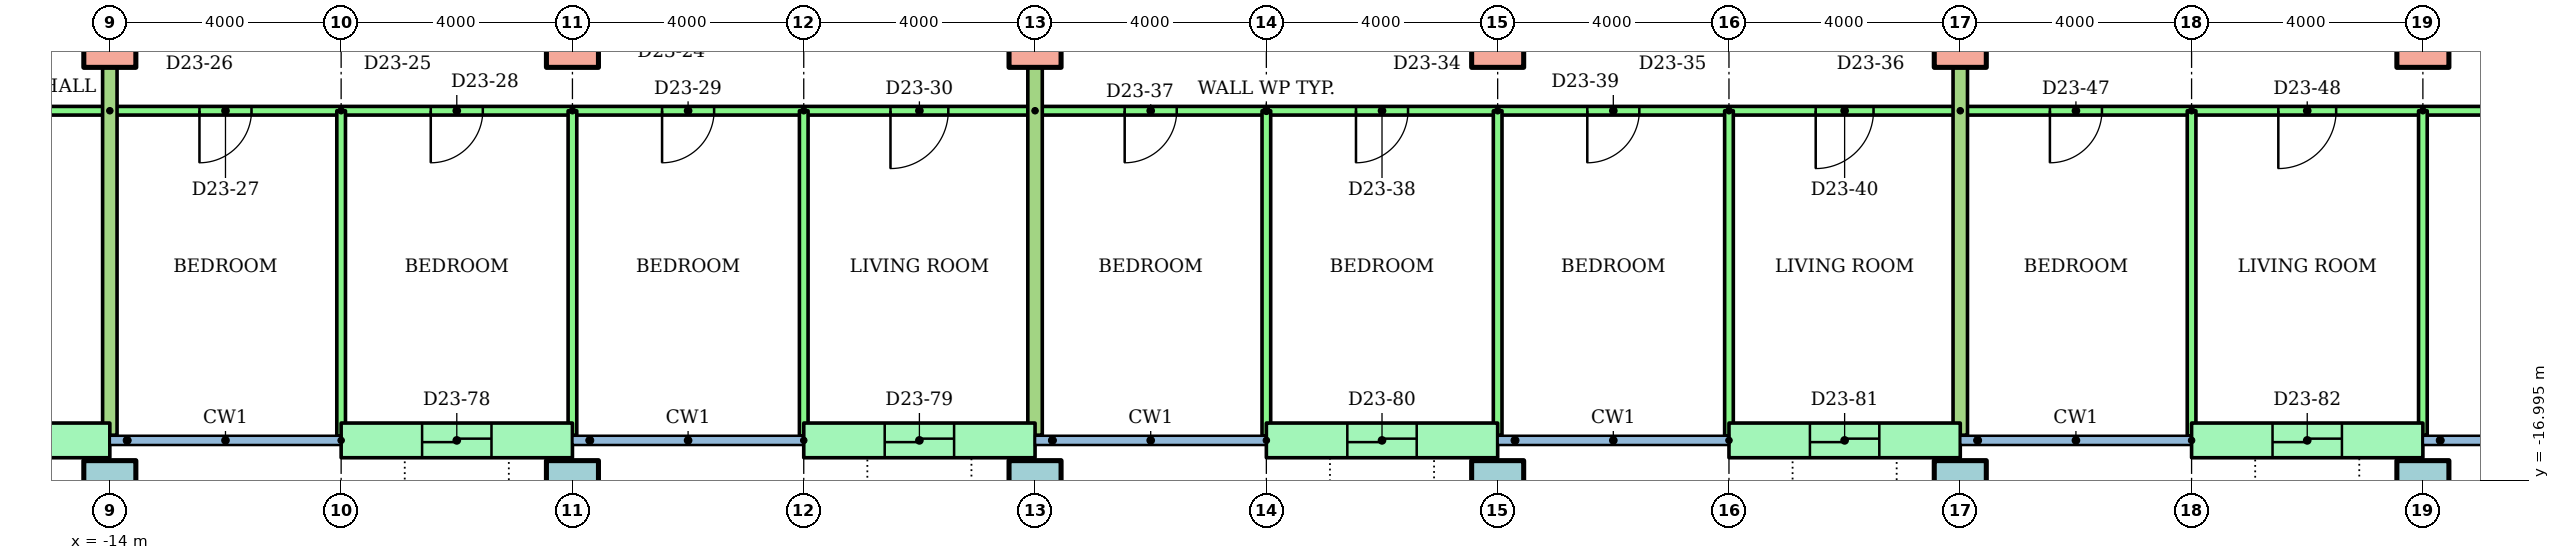
"""IFC4 building model, lengths in metres.
Left out: names, types, materials, properties, quantities, classifications, styles, units other than length and angle.
Written with IfcOpenShell. Run it as: python <this file> out.ifc"""

import sys

from ifc_helpers import new_model, si_unit, direction, frame, frame_2d, origin, origin_2d, place, context, subcontext, project, spatial, rectangle, hollow_rectangle, extrude, element, fill, save


model = new_model("IFC4")
c1 = context("Model", 3, precision=1e-05, world=origin(), true_north=direction((0.0, 1.0)))
c2 = subcontext(c1, "Body", "Model", "MODEL_VIEW")
j1 = project(units=[si_unit("LENGTHUNIT", "METRE"), si_unit("PLANEANGLEUNIT", "RADIAN")], contexts=[c1])
p1 = place(None, origin())
s1 = spatial("IfcSite", under=j1, at=p1, CompositionType="ELEMENT")
p2 = place(p1, origin())
s2 = spatial("IfcBuilding", under=s1, at=p2, CompositionType="ELEMENT")
p3 = place(p2, frame((0.0, 0.0, 90.3)))
s3 = spatial("IfcBuildingStorey", under=s2, at=p3, CompositionType="ELEMENT", Elevation=90.3)
for number, where in (
    (1, (-14.0, -17.1, 0.0)),
    (2, (-6.0, -17.1, 0.0)),
    (3, (2.0, -17.1, 0.0)),
    (4, (10.0, -17.1, 0.0)),
    (5, (18.0, -17.1, 0.0)),
    (6, (26.0, -17.1, 0.0)),
):
    element("IfcColumn", number, at=place(p3, frame(where)), inside=s3, PredefinedType="COLUMN", context=c2, shape_type="SweptSolid", body=[
        extrude(hollow_rectangle(XDim=0.9, YDim=0.9, WallThickness=0.045, at=origin_2d()), origin(), (0.0, 0.0, 1.0), 3.2),
    ])
for number, where in (
    (7, (-14.0, -9.4, 0.0)),
    (8, (-6.0, -9.4, 0.0)),
    (9, (2.0, -9.4, 0.0)),
    (10, (10.0, -9.4, 0.0)),
    (11, (18.0, -9.4, 0.0)),
    (12, (26.0, -9.4, 0.0)),
):
    element("IfcColumn", number, at=place(p3, frame(where)), inside=s3, PredefinedType="COLUMN", context=c2, shape_type="SweptSolid", body=[
        extrude(rectangle(XDim=0.9, YDim=0.9, at=origin_2d()), origin(), (0.0, 0.0, 1.0), 3.2),
    ])
p4 = place(p3, frame((-18.0, -16.3, 0.0)))
e13 = element("IfcWall", 13, at=p4, inside=s3, PredefinedType="STANDARD", context=c2, shape_type="SweptSolid", body=[
    extrude(rectangle(XDim=4.0, YDim=0.6, at=frame_2d((2.0, 0.0))), origin(), (0.0, 0.0, 1.0), 2.92),
])
p5 = place(p4, frame((1.4, 0.0, 0.0)))
e14 = element("IfcOpeningElement", 14, at=p5, cuts=e13, PredefinedType="OPENING", context=c2, shape_type="SweptSolid", body=[
    extrude(rectangle(XDim=1.2, YDim=2.1, at=frame_2d((0.6, 1.05))), frame((0.0, 0.31, 0.0), z_axis=(0.0, -1.0, 0.0), x_axis=(1.0, 0.0, 0.0)), (0.0, 0.0, 1.0), 0.62),
])
p6 = place(p3, frame((-10.0, -16.3, 0.0)))
e15 = element("IfcWall", 15, at=p6, inside=s3, PredefinedType="STANDARD", context=c2, shape_type="SweptSolid", body=[
    extrude(rectangle(XDim=4.0, YDim=0.6, at=frame_2d((2.0, 0.0))), origin(), (0.0, 0.0, 1.0), 2.92),
])
p7 = place(p6, frame((1.4, 0.0, 0.0)))
e16 = element("IfcOpeningElement", 16, at=p7, cuts=e15, PredefinedType="OPENING", context=c2, shape_type="SweptSolid", body=[
    extrude(rectangle(XDim=1.2, YDim=2.1, at=frame_2d((0.6, 1.05))), frame((0.0, 0.31, 0.0), z_axis=(0.0, -1.0, 0.0), x_axis=(1.0, 0.0, 0.0)), (0.0, 0.0, 1.0), 0.62),
])
p8 = place(p3, frame((-2.0, -16.3, 0.0)))
e17 = element("IfcWall", 17, at=p8, inside=s3, PredefinedType="STANDARD", context=c2, shape_type="SweptSolid", body=[
    extrude(rectangle(XDim=4.0, YDim=0.6, at=frame_2d((2.0, 0.0))), origin(), (0.0, 0.0, 1.0), 2.92),
])
p9 = place(p8, frame((1.4, 0.0, 0.0)))
e18 = element("IfcOpeningElement", 18, at=p9, cuts=e17, PredefinedType="OPENING", context=c2, shape_type="SweptSolid", body=[
    extrude(rectangle(XDim=1.2, YDim=2.1, at=frame_2d((0.6, 1.05))), frame((0.0, 0.31, 0.0), z_axis=(0.0, -1.0, 0.0), x_axis=(1.0, 0.0, 0.0)), (0.0, 0.0, 1.0), 0.62),
])
p10 = place(p3, frame((6.0, -16.3, 0.0)))
e19 = element("IfcWall", 19, at=p10, inside=s3, PredefinedType="STANDARD", context=c2, shape_type="SweptSolid", body=[
    extrude(rectangle(XDim=4.0, YDim=0.6, at=frame_2d((2.0, 0.0))), origin(), (0.0, 0.0, 1.0), 2.92),
])
p11 = place(p10, frame((1.4, 0.0, 0.0)))
e20 = element("IfcOpeningElement", 20, at=p11, cuts=e19, PredefinedType="OPENING", context=c2, shape_type="SweptSolid", body=[
    extrude(rectangle(XDim=1.2, YDim=2.1, at=frame_2d((0.6, 1.05))), frame((0.0, 0.31, 0.0), z_axis=(0.0, -1.0, 0.0), x_axis=(1.0, 0.0, 0.0)), (0.0, 0.0, 1.0), 0.62),
])
p12 = place(p3, frame((14.0, -16.3, 0.0)))
e21 = element("IfcWall", 21, at=p12, inside=s3, PredefinedType="STANDARD", context=c2, shape_type="SweptSolid", body=[
    extrude(rectangle(XDim=4.0, YDim=0.6, at=frame_2d((2.0, 0.0))), origin(), (0.0, 0.0, 1.0), 2.92),
])
p13 = place(p12, frame((1.4, 0.0, 0.0)))
e22 = element("IfcOpeningElement", 22, at=p13, cuts=e21, PredefinedType="OPENING", context=c2, shape_type="SweptSolid", body=[
    extrude(rectangle(XDim=1.2, YDim=2.1, at=frame_2d((0.6, 1.05))), frame((0.0, 0.31, 0.0), z_axis=(0.0, -1.0, 0.0), x_axis=(1.0, 0.0, 0.0)), (0.0, 0.0, 1.0), 0.62),
])
p14 = place(p3, frame((22.0, -16.3, 0.0)))
e23 = element("IfcWall", 23, at=p14, inside=s3, PredefinedType="STANDARD", context=c2, shape_type="SweptSolid", body=[
    extrude(rectangle(XDim=4.0, YDim=0.6, at=frame_2d((2.0, 0.0))), origin(), (0.0, 0.0, 1.0), 2.92),
])
p15 = place(p14, frame((1.4, 0.0, 0.0)))
e24 = element("IfcOpeningElement", 24, at=p15, cuts=e23, PredefinedType="OPENING", context=c2, shape_type="SweptSolid", body=[
    extrude(rectangle(XDim=1.2, YDim=2.1, at=frame_2d((0.6, 1.05))), frame((0.0, 0.31, 0.0), z_axis=(0.0, -1.0, 0.0), x_axis=(1.0, 0.0, 0.0)), (0.0, 0.0, 1.0), 0.62),
])
p16 = place(p3, frame((-14.0, -10.6, 0.0), z_axis=(0.0, 0.0, 1.0), x_axis=(-1.0, 0.0, 0.0)))
e25 = element("IfcWall", 25, at=p16, inside=s3, PredefinedType="PARTITIONING", context=c2, shape_type="SweptSolid", body=[
    extrude(rectangle(XDim=14.62, YDim=0.15, at=frame_2d((7.31, 0.0))), origin(), (0.0, 0.0, 1.0), 2.4),
])
p17 = place(p16, frame((11.7, 0.0, 0.0)))
e26 = element("IfcOpeningElement", 26, at=p17, cuts=e25, PredefinedType="OPENING", context=c2, shape_type="SweptSolid", body=[
    extrude(rectangle(XDim=0.9, YDim=2.1, at=frame_2d((0.45, 1.05))), frame((0.0, 0.085, 0.0), z_axis=(0.0, -1.0, 0.0), x_axis=(1.0, 0.0, 0.0)), (0.0, 0.0, 1.0), 0.17),
])
p18 = place(p16, frame((4.45, 0.0, 0.0)))
e27 = element("IfcOpeningElement", 27, at=p18, cuts=e25, PredefinedType="OPENING", context=c2, shape_type="SweptSolid", body=[
    extrude(rectangle(XDim=1.0, YDim=2.1, at=frame_2d((0.5, 1.05))), frame((0.0, 0.085, 0.0), z_axis=(0.0, -1.0, 0.0), x_axis=(1.0, 0.0, 0.0)), (0.0, 0.0, 1.0), 0.17),
])
p19 = place(p3, frame((2.0, -10.6, 0.0), z_axis=(0.0, 0.0, 1.0), x_axis=(-1.0, 0.0, 0.0)))
e28 = element("IfcWall", 28, at=p19, inside=s3, PredefinedType="PARTITIONING", context=c2, shape_type="SweptSolid", body=[
    extrude(rectangle(XDim=16.0, YDim=0.15, at=frame_2d((8.0, 0.0))), origin(), (0.0, 0.0, 1.0), 2.4),
])
p20 = place(p19, frame((13.55, 0.0, 0.0)))
e29 = element("IfcOpeningElement", 29, at=p20, cuts=e28, PredefinedType="OPENING", context=c2, shape_type="SweptSolid", body=[
    extrude(rectangle(XDim=0.9, YDim=2.1, at=frame_2d((0.45, 1.05))), frame((0.0, 0.085, 0.0), z_axis=(0.0, -1.0, 0.0), x_axis=(1.0, 0.0, 0.0)), (0.0, 0.0, 1.0), 0.17),
])
p21 = place(p19, frame((9.55, 0.0, 0.0)))
e30 = element("IfcOpeningElement", 30, at=p21, cuts=e28, PredefinedType="OPENING", context=c2, shape_type="SweptSolid", body=[
    extrude(rectangle(XDim=0.9, YDim=2.1, at=frame_2d((0.45, 1.05))), frame((0.0, 0.085, 0.0), z_axis=(0.0, -1.0, 0.0), x_axis=(1.0, 0.0, 0.0)), (0.0, 0.0, 1.0), 0.17),
])
p22 = place(p19, frame((5.55, 0.0, 0.0)))
e31 = element("IfcOpeningElement", 31, at=p22, cuts=e28, PredefinedType="OPENING", context=c2, shape_type="SweptSolid", body=[
    extrude(rectangle(XDim=0.9, YDim=2.1, at=frame_2d((0.45, 1.05))), frame((0.0, 0.085, 0.0), z_axis=(0.0, -1.0, 0.0), x_axis=(1.0, 0.0, 0.0)), (0.0, 0.0, 1.0), 0.17),
])
p23 = place(p19, frame((1.5, 0.0, 0.0)))
e32 = element("IfcOpeningElement", 32, at=p23, cuts=e28, PredefinedType="OPENING", context=c2, shape_type="SweptSolid", body=[
    extrude(rectangle(XDim=1.0, YDim=2.1, at=frame_2d((0.5, 1.05))), frame((0.0, 0.085, 0.0), z_axis=(0.0, -1.0, 0.0), x_axis=(1.0, 0.0, 0.0)), (0.0, 0.0, 1.0), 0.17),
])
p24 = place(p3, frame((-10.0, -10.6, 0.0), z_axis=(0.0, 0.0, 1.0), x_axis=(0.0, -1.0, 0.0)))
e33 = element("IfcWall", 33, at=p24, inside=s3, PredefinedType="PARTITIONING", context=c2, shape_type="SweptSolid", body=[
    extrude(rectangle(XDim=5.621, YDim=0.15, at=frame_2d((2.811, 0.0))), origin(), (0.0, 0.0, 1.0), 2.4),
])
p25 = place(p3, frame((-6.0, -10.6, 0.0), z_axis=(0.0, 0.0, 1.0), x_axis=(0.0, -1.0, 0.0)))
e34 = element("IfcWall", 34, at=p25, inside=s3, PredefinedType="PARTITIONING", context=c2, shape_type="SweptSolid", body=[
    extrude(rectangle(XDim=5.61, YDim=0.15, at=frame_2d((2.805, 0.0))), origin(), (0.0, 0.0, 1.0), 2.4),
])
p26 = place(p3, frame((-2.0, -10.6, 0.0), z_axis=(0.0, 0.0, 1.0), x_axis=(0.0, -1.0, 0.0)))
e35 = element("IfcWall", 35, at=p26, inside=s3, PredefinedType="PARTITIONING", context=c2, shape_type="SweptSolid", body=[
    extrude(rectangle(XDim=5.621, YDim=0.15, at=frame_2d((2.811, 0.0))), origin(), (0.0, 0.0, 1.0), 2.4),
])
p27 = place(p3, frame((-14.0, -1.4, 0.0), z_axis=(0.0, 0.0, 1.0), x_axis=(0.0, -1.0, 0.0)))
e36 = element("IfcWall", 36, at=p27, inside=s3, PredefinedType="PARTITIONING", context=c2, shape_type="SweptSolid", body=[
    extrude(rectangle(XDim=14.81, YDim=0.25, at=frame_2d((7.405, 0.0))), origin(), (0.0, 0.0, 1.0), 2.4),
])
p28 = place(p3, frame((18.0, -10.6, 0.0), z_axis=(0.0, 0.0, 1.0), x_axis=(-1.0, 0.0, 0.0)))
e37 = element("IfcWall", 37, at=p28, inside=s3, PredefinedType="PARTITIONING", context=c2, shape_type="SweptSolid", body=[
    extrude(rectangle(XDim=16.0, YDim=0.15, at=frame_2d((8.0, 0.0))), origin(), (0.0, 0.0, 1.0), 2.4),
])
p29 = place(p28, frame((13.55, 0.0, 0.0)))
e38 = element("IfcOpeningElement", 38, at=p29, cuts=e37, PredefinedType="OPENING", context=c2, shape_type="SweptSolid", body=[
    extrude(rectangle(XDim=0.9, YDim=2.1, at=frame_2d((0.45, 1.05))), frame((0.0, 0.085, 0.0), z_axis=(0.0, -1.0, 0.0), x_axis=(1.0, 0.0, 0.0)), (0.0, 0.0, 1.0), 0.17),
])
p30 = place(p28, frame((9.55, 0.0, 0.0)))
e39 = element("IfcOpeningElement", 39, at=p30, cuts=e37, PredefinedType="OPENING", context=c2, shape_type="SweptSolid", body=[
    extrude(rectangle(XDim=0.9, YDim=2.1, at=frame_2d((0.45, 1.05))), frame((0.0, 0.085, 0.0), z_axis=(0.0, -1.0, 0.0), x_axis=(1.0, 0.0, 0.0)), (0.0, 0.0, 1.0), 0.17),
])
p31 = place(p28, frame((5.55, 0.0, 0.0)))
e40 = element("IfcOpeningElement", 40, at=p31, cuts=e37, PredefinedType="OPENING", context=c2, shape_type="SweptSolid", body=[
    extrude(rectangle(XDim=0.9, YDim=2.1, at=frame_2d((0.45, 1.05))), frame((0.0, 0.085, 0.0), z_axis=(0.0, -1.0, 0.0), x_axis=(1.0, 0.0, 0.0)), (0.0, 0.0, 1.0), 0.17),
])
p32 = place(p28, frame((1.5, 0.0, 0.0)))
e41 = element("IfcOpeningElement", 41, at=p32, cuts=e37, PredefinedType="OPENING", context=c2, shape_type="SweptSolid", body=[
    extrude(rectangle(XDim=1.0, YDim=2.1, at=frame_2d((0.5, 1.05))), frame((0.0, 0.085, 0.0), z_axis=(0.0, -1.0, 0.0), x_axis=(1.0, 0.0, 0.0)), (0.0, 0.0, 1.0), 0.17),
])
p33 = place(p3, frame((6.0, -10.6, 0.0), z_axis=(0.0, 0.0, 1.0), x_axis=(0.0, -1.0, 0.0)))
e42 = element("IfcWall", 42, at=p33, inside=s3, PredefinedType="PARTITIONING", context=c2, shape_type="SweptSolid", body=[
    extrude(rectangle(XDim=5.621, YDim=0.15, at=frame_2d((2.811, 0.0))), origin(), (0.0, 0.0, 1.0), 2.4),
])
p34 = place(p3, frame((10.0, -10.6, 0.0), z_axis=(0.0, 0.0, 1.0), x_axis=(0.0, -1.0, 0.0)))
e43 = element("IfcWall", 43, at=p34, inside=s3, PredefinedType="PARTITIONING", context=c2, shape_type="SweptSolid", body=[
    extrude(rectangle(XDim=5.61, YDim=0.15, at=frame_2d((2.805, 0.0))), origin(), (0.0, 0.0, 1.0), 2.4),
])
p35 = place(p3, frame((14.0, -10.6, 0.0), z_axis=(0.0, 0.0, 1.0), x_axis=(0.0, -1.0, 0.0)))
e44 = element("IfcWall", 44, at=p35, inside=s3, PredefinedType="PARTITIONING", context=c2, shape_type="SweptSolid", body=[
    extrude(rectangle(XDim=5.621, YDim=0.15, at=frame_2d((2.811, 0.0))), origin(), (0.0, 0.0, 1.0), 2.4),
])
p36 = place(p3, frame((2.0, -1.4, 0.0), z_axis=(0.0, 0.0, 1.0), x_axis=(0.0, -1.0, 0.0)))
e45 = element("IfcWall", 45, at=p36, inside=s3, PredefinedType="PARTITIONING", context=c2, shape_type="SweptSolid", body=[
    extrude(rectangle(XDim=14.81, YDim=0.25, at=frame_2d((7.405, 0.0))), origin(), (0.0, 0.0, 1.0), 2.4),
])
p37 = place(p3, frame((40.62, -10.6, 0.0), z_axis=(0.0, 0.0, 1.0), x_axis=(-1.0, 0.0, 0.0)))
e46 = element("IfcWall", 46, at=p37, inside=s3, PredefinedType="PARTITIONING", context=c2, shape_type="SweptSolid", body=[
    extrude(rectangle(XDim=22.62, YDim=0.15, at=frame_2d((11.31, 0.0))), origin(), (0.0, 0.0, 1.0), 2.4),
])
p38 = place(p37, frame((20.17, 0.0, 0.0)))
e47 = element("IfcOpeningElement", 47, at=p38, cuts=e46, PredefinedType="OPENING", context=c2, shape_type="SweptSolid", body=[
    extrude(rectangle(XDim=0.9, YDim=2.1, at=frame_2d((0.45, 1.05))), frame((0.0, 0.085, 0.0), z_axis=(0.0, -1.0, 0.0), x_axis=(1.0, 0.0, 0.0)), (0.0, 0.0, 1.0), 0.17),
])
p39 = place(p37, frame((16.12, 0.0, 0.0)))
e48 = element("IfcOpeningElement", 48, at=p39, cuts=e46, PredefinedType="OPENING", context=c2, shape_type="SweptSolid", body=[
    extrude(rectangle(XDim=1.0, YDim=2.1, at=frame_2d((0.5, 1.05))), frame((0.0, 0.085, 0.0), z_axis=(0.0, -1.0, 0.0), x_axis=(1.0, 0.0, 0.0)), (0.0, 0.0, 1.0), 0.17),
])
p40 = place(p37, frame((12.17, 0.0, 0.0)))
e49 = element("IfcOpeningElement", 49, at=p40, cuts=e46, PredefinedType="OPENING", context=c2, shape_type="SweptSolid", body=[
    extrude(rectangle(XDim=0.9, YDim=2.1, at=frame_2d((0.45, 1.05))), frame((0.0, 0.085, 0.0), z_axis=(0.0, -1.0, 0.0), x_axis=(1.0, 0.0, 0.0)), (0.0, 0.0, 1.0), 0.17),
])
p41 = place(p37, frame((8.17, 0.0, 0.0)))
e50 = element("IfcOpeningElement", 50, at=p41, cuts=e46, PredefinedType="OPENING", context=c2, shape_type="SweptSolid", body=[
    extrude(rectangle(XDim=0.9, YDim=2.1, at=frame_2d((0.45, 1.05))), frame((0.0, 0.085, 0.0), z_axis=(0.0, -1.0, 0.0), x_axis=(1.0, 0.0, 0.0)), (0.0, 0.0, 1.0), 0.17),
])
p42 = place(p37, frame((2.97, 0.0, 0.0)))
e51 = element("IfcOpeningElement", 51, at=p42, cuts=e46, PredefinedType="OPENING", context=c2, shape_type="SweptSolid", body=[
    extrude(rectangle(XDim=0.9, YDim=2.1, at=frame_2d((0.45, 1.05))), frame((0.0, 0.085, 0.0), z_axis=(0.0, -1.0, 0.0), x_axis=(1.0, 0.0, 0.0)), (0.0, 0.0, 1.0), 0.17),
])
p43 = place(p3, frame((22.0, -10.6, 0.0), z_axis=(0.0, 0.0, 1.0), x_axis=(0.0, -1.0, 0.0)))
e52 = element("IfcWall", 52, at=p43, inside=s3, PredefinedType="PARTITIONING", context=c2, shape_type="SweptSolid", body=[
    extrude(rectangle(XDim=5.621, YDim=0.15, at=frame_2d((2.811, 0.0))), origin(), (0.0, 0.0, 1.0), 2.4),
])
p44 = place(p3, frame((26.0, -10.6, 0.0), z_axis=(0.0, 0.0, 1.0), x_axis=(0.0, -1.0, 0.0)))
e53 = element("IfcWall", 53, at=p44, inside=s3, PredefinedType="PARTITIONING", context=c2, shape_type="SweptSolid", body=[
    extrude(rectangle(XDim=5.61, YDim=0.15, at=frame_2d((2.805, 0.0))), origin(), (0.0, 0.0, 1.0), 2.4),
])
p45 = place(p3, frame((18.0, -1.4, 0.0), z_axis=(0.0, 0.0, 1.0), x_axis=(0.0, -1.0, 0.0)))
e54 = element("IfcWall", 54, at=p45, inside=s3, PredefinedType="PARTITIONING", context=c2, shape_type="SweptSolid", body=[
    extrude(rectangle(XDim=14.81, YDim=0.25, at=frame_2d((7.405, 0.0))), origin(), (0.0, 0.0, 1.0), 2.4),
])
p46 = place(p20, origin())
e55 = element("IfcDoor", 55, at=p46, inside=s3, OperationType="SINGLE_SWING_RIGHT", PredefinedType="DOOR", context=c2, shape_type="SweptSolid", body=[
    extrude(rectangle(XDim=0.9, YDim=2.1, at=frame_2d((0.45, 1.05))), frame((0.0, 0.025, 0.0), z_axis=(0.0, -1.0, 0.0), x_axis=(1.0, 0.0, 0.0)), (0.0, 0.0, 1.0), 0.05),
])
fill(e29, e55)
p47 = place(p21, origin())
e56 = element("IfcDoor", 56, at=p47, inside=s3, OperationType="SINGLE_SWING_RIGHT", PredefinedType="DOOR", context=c2, shape_type="SweptSolid", body=[
    extrude(rectangle(XDim=0.9, YDim=2.1, at=frame_2d((0.45, 1.05))), frame((0.0, 0.025, 0.0), z_axis=(0.0, -1.0, 0.0), x_axis=(1.0, 0.0, 0.0)), (0.0, 0.0, 1.0), 0.05),
])
fill(e30, e56)
p48 = place(p22, origin())
e57 = element("IfcDoor", 57, at=p48, inside=s3, OperationType="SINGLE_SWING_RIGHT", PredefinedType="DOOR", context=c2, shape_type="SweptSolid", body=[
    extrude(rectangle(XDim=0.9, YDim=2.1, at=frame_2d((0.45, 1.05))), frame((0.0, 0.025, 0.0), z_axis=(0.0, -1.0, 0.0), x_axis=(1.0, 0.0, 0.0)), (0.0, 0.0, 1.0), 0.05),
])
fill(e31, e57)
p49 = place(p23, origin())
e58 = element("IfcDoor", 58, at=p49, inside=s3, OperationType="SINGLE_SWING_RIGHT", PredefinedType="DOOR", context=c2, shape_type="SweptSolid", body=[
    extrude(rectangle(XDim=1.0, YDim=2.1, at=frame_2d((0.5, 1.05))), frame((0.0, 0.025, 0.0), z_axis=(0.0, -1.0, 0.0), x_axis=(1.0, 0.0, 0.0)), (0.0, 0.0, 1.0), 0.05),
])
fill(e32, e58)
p50 = place(p29, origin())
e59 = element("IfcDoor", 59, at=p50, inside=s3, OperationType="SINGLE_SWING_RIGHT", PredefinedType="DOOR", context=c2, shape_type="SweptSolid", body=[
    extrude(rectangle(XDim=0.9, YDim=2.1, at=frame_2d((0.45, 1.05))), frame((0.0, 0.025, 0.0), z_axis=(0.0, -1.0, 0.0), x_axis=(1.0, 0.0, 0.0)), (0.0, 0.0, 1.0), 0.05),
])
fill(e38, e59)
p51 = place(p30, origin())
e60 = element("IfcDoor", 60, at=p51, inside=s3, OperationType="SINGLE_SWING_RIGHT", PredefinedType="DOOR", context=c2, shape_type="SweptSolid", body=[
    extrude(rectangle(XDim=0.9, YDim=2.1, at=frame_2d((0.45, 1.05))), frame((0.0, 0.025, 0.0), z_axis=(0.0, -1.0, 0.0), x_axis=(1.0, 0.0, 0.0)), (0.0, 0.0, 1.0), 0.05),
])
fill(e39, e60)
p52 = place(p31, origin())
e61 = element("IfcDoor", 61, at=p52, inside=s3, OperationType="SINGLE_SWING_RIGHT", PredefinedType="DOOR", context=c2, shape_type="SweptSolid", body=[
    extrude(rectangle(XDim=0.9, YDim=2.1, at=frame_2d((0.45, 1.05))), frame((0.0, 0.025, 0.0), z_axis=(0.0, -1.0, 0.0), x_axis=(1.0, 0.0, 0.0)), (0.0, 0.0, 1.0), 0.05),
])
fill(e40, e61)
p53 = place(p32, origin())
e62 = element("IfcDoor", 62, at=p53, inside=s3, OperationType="SINGLE_SWING_RIGHT", PredefinedType="DOOR", context=c2, shape_type="SweptSolid", body=[
    extrude(rectangle(XDim=1.0, YDim=2.1, at=frame_2d((0.5, 1.05))), frame((0.0, 0.025, 0.0), z_axis=(0.0, -1.0, 0.0), x_axis=(1.0, 0.0, 0.0)), (0.0, 0.0, 1.0), 0.05),
])
fill(e41, e62)
p54 = place(p38, origin())
e63 = element("IfcDoor", 63, at=p54, inside=s3, OperationType="SINGLE_SWING_RIGHT", PredefinedType="DOOR", context=c2, shape_type="SweptSolid", body=[
    extrude(rectangle(XDim=0.9, YDim=2.1, at=frame_2d((0.45, 1.05))), frame((0.0, 0.025, 0.0), z_axis=(0.0, -1.0, 0.0), x_axis=(1.0, 0.0, 0.0)), (0.0, 0.0, 1.0), 0.05),
])
fill(e47, e63)
p55 = place(p39, origin())
e64 = element("IfcDoor", 64, at=p55, inside=s3, OperationType="SINGLE_SWING_RIGHT", PredefinedType="DOOR", context=c2, shape_type="SweptSolid", body=[
    extrude(rectangle(XDim=1.0, YDim=2.1, at=frame_2d((0.5, 1.05))), frame((0.0, 0.025, 0.0), z_axis=(0.0, -1.0, 0.0), x_axis=(1.0, 0.0, 0.0)), (0.0, 0.0, 1.0), 0.05),
])
fill(e48, e64)
p56 = place(p7, origin())
e65 = element("IfcDoor", 65, at=p56, inside=s3, OperationType="SLIDING_TO_LEFT", PredefinedType="DOOR", context=c2, shape_type="SweptSolid", body=[
    extrude(rectangle(XDim=1.2, YDim=2.1, at=frame_2d((0.6, 1.05))), frame((0.0, 0.025, 0.0), z_axis=(0.0, -1.0, 0.0), x_axis=(1.0, 0.0, 0.0)), (0.0, 0.0, 1.0), 0.05),
])
fill(e16, e65)
p57 = place(p9, origin())
e66 = element("IfcDoor", 66, at=p57, inside=s3, OperationType="SLIDING_TO_LEFT", PredefinedType="DOOR", context=c2, shape_type="SweptSolid", body=[
    extrude(rectangle(XDim=1.2, YDim=2.1, at=frame_2d((0.6, 1.05))), frame((0.0, 0.025, 0.0), z_axis=(0.0, -1.0, 0.0), x_axis=(1.0, 0.0, 0.0)), (0.0, 0.0, 1.0), 0.05),
])
fill(e18, e66)
p58 = place(p11, origin())
e67 = element("IfcDoor", 67, at=p58, inside=s3, OperationType="SLIDING_TO_LEFT", PredefinedType="DOOR", context=c2, shape_type="SweptSolid", body=[
    extrude(rectangle(XDim=1.2, YDim=2.1, at=frame_2d((0.6, 1.05))), frame((0.0, 0.025, 0.0), z_axis=(0.0, -1.0, 0.0), x_axis=(1.0, 0.0, 0.0)), (0.0, 0.0, 1.0), 0.05),
])
fill(e20, e67)
p59 = place(p13, origin())
e68 = element("IfcDoor", 68, at=p59, inside=s3, OperationType="SLIDING_TO_LEFT", PredefinedType="DOOR", context=c2, shape_type="SweptSolid", body=[
    extrude(rectangle(XDim=1.2, YDim=2.1, at=frame_2d((0.6, 1.05))), frame((0.0, 0.025, 0.0), z_axis=(0.0, -1.0, 0.0), x_axis=(1.0, 0.0, 0.0)), (0.0, 0.0, 1.0), 0.05),
])
fill(e22, e68)
p60 = place(p15, origin())
e69 = element("IfcDoor", 69, at=p60, inside=s3, OperationType="SLIDING_TO_LEFT", PredefinedType="DOOR", context=c2, shape_type="SweptSolid", body=[
    extrude(rectangle(XDim=1.2, YDim=2.1, at=frame_2d((0.6, 1.05))), frame((0.0, 0.025, 0.0), z_axis=(0.0, -1.0, 0.0), x_axis=(1.0, 0.0, 0.0)), (0.0, 0.0, 1.0), 0.05),
])
fill(e24, e69)
save(model, sys.argv[1])
